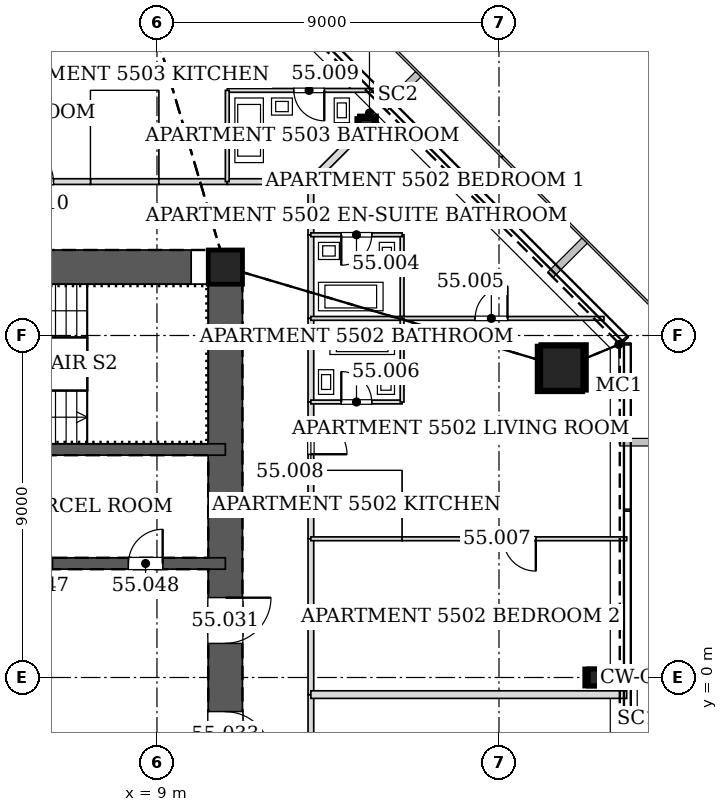
"""IFC4 building model, lengths in metres.
Left out: names, types, materials, properties, quantities, classifications, styles, units other than length and angle.
Written with IfcOpenShell. Run it as: python <this file> out.ifc"""

import sys

from ifc_helpers import new_model, si_unit, direction, frame, frame_2d, origin, origin_2d, place, context, subcontext, project, spatial, rectangle, hollow_rectangle, extrude, element, fill, save


model = new_model("IFC4")
c1 = context("Model", 3, precision=1e-05, world=origin(), true_north=direction((0.0, 1.0)))
c2 = subcontext(c1, "Body", "Model", "MODEL_VIEW")
j1 = project(units=[si_unit("LENGTHUNIT", "METRE"), si_unit("PLANEANGLEUNIT", "RADIAN")], contexts=[c1])
p1 = place(None, origin())
s1 = spatial("IfcSite", under=j1, at=p1, CompositionType="ELEMENT")
p2 = place(p1, origin())
s2 = spatial("IfcBuilding", under=s1, at=p2, CompositionType="ELEMENT")
p3 = place(p2, frame((0.0, 0.0, 234.6)))
s3 = spatial("IfcBuildingStorey", under=s2, at=p3, CompositionType="ELEMENT", Elevation=234.6)
p4 = place(p3, frame((19.7, 8.16, 0.0), z_axis=(-0.02827915051, -0.01169924247, 0.999531598986), x_axis=(0.382282742426, -0.924045401938, 0.0)))
e1 = element("IfcColumn", 1, at=p4, inside=s3, PredefinedType="COLUMN", context=c2, shape_type="SweptSolid", body=[
    extrude(hollow_rectangle(XDim=1.2, YDim=1.2, WallThickness=0.055, at=origin_2d()), origin(), (0.0, 0.0, 1.0), 3.402),
])
for number, where, z_axis, x_axis in (
    (2, (20.578, 0.0, 0.0), (-0.028, 0.0, 1.0), (0.0, -1.0, 0.0)),
    (3, (14.551, 14.551, 0.0), (-0.02, -0.02, 1.0), (0.707, -0.707, 0.0)),
):
    element("IfcColumn", number, at=place(p3, frame(where, z_axis=z_axis, x_axis=x_axis)), inside=s3, PredefinedType="COLUMN", context=c2, shape_type="SweptSolid", body=[
        extrude(hollow_rectangle(XDim=0.45, YDim=0.45, WallThickness=0.02, at=origin_2d()), origin(), (0.0, 0.0, 1.0), 3.401),
    ])
p5 = place(p3, frame((10.8, 10.8, 0.0), z_axis=(0.0, 0.0, 1.0), x_axis=(1.0, 0.0, 0.0)))
e4 = element("IfcColumn", 4, at=p5, inside=s3, PredefinedType="COLUMN", context=c2, shape_type="SweptSolid", body=[
    extrude(hollow_rectangle(XDim=0.9, YDim=0.9, WallThickness=0.04, at=origin_2d()), origin(), (0.0, 0.0, 1.0), 3.4),
])
p6 = place(p3, frame((10.8, -10.8, 0.0), z_axis=(0.0, 0.0, 1.0), x_axis=(0.0, 1.0, 0.0)))
e5 = element("IfcWall", 5, at=p6, inside=s3, PredefinedType="SOLIDWALL", context=c2, shape_type="SweptSolid", body=[
    extrude(rectangle(XDim=21.6, YDim=0.9, at=frame_2d((10.8, 0.0))), origin(), (0.0, 0.0, 1.0), 3.4),
])
p7 = place(p6, frame((11.7, 0.0, 0.0)))
e6 = element("IfcOpeningElement", 6, at=p7, cuts=e5, PredefinedType="OPENING", context=c2, shape_type="SweptSolid", body=[
    extrude(rectangle(XDim=1.2, YDim=2.1, at=frame_2d((0.6, 1.05))), frame((0.0, 0.46, 0.0), z_axis=(0.0, -1.0, 0.0), x_axis=(1.0, 0.0, 0.0)), (0.0, 0.0, 1.0), 0.92),
])
p8 = place(p6, frame((8.7, 0.0, 0.0)))
e7 = element("IfcOpeningElement", 7, at=p8, cuts=e5, PredefinedType="OPENING", context=c2, shape_type="SweptSolid", body=[
    extrude(rectangle(XDim=1.2, YDim=2.1, at=frame_2d((0.6, 1.05))), frame((0.0, 0.46, 0.0), z_axis=(0.0, -1.0, 0.0), x_axis=(1.0, 0.0, 0.0)), (0.0, 0.0, 1.0), 0.92),
])
p9 = place(p3, frame((10.8, 10.8, 0.0), z_axis=(0.0, 0.0, 1.0), x_axis=(-1.0, 0.0, 0.0)))
e8 = element("IfcWall", 8, at=p9, inside=s3, PredefinedType="SOLIDWALL", context=c2, shape_type="SweptSolid", body=[
    extrude(rectangle(XDim=21.6, YDim=0.9, at=frame_2d((10.8, 0.0))), origin(), (0.0, 0.0, 1.0), 3.4),
])
p10 = place(p9, frame((10.05, 0.0, 0.0)))
e9 = element("IfcOpeningElement", 9, at=p10, cuts=e8, PredefinedType="OPENING", context=c2, shape_type="SweptSolid", body=[
    extrude(rectangle(XDim=1.5, YDim=2.1, at=frame_2d((0.75, 1.05))), frame((0.0, 0.46, 0.0), z_axis=(0.0, -1.0, 0.0), x_axis=(1.0, 0.0, 0.0)), (0.0, 0.0, 1.0), 0.92),
])
p11 = place(p3, frame((-10.8, 3.0, 0.0), z_axis=(0.0, 0.0, 1.0), x_axis=(1.0, 0.0, 0.0)))
e10 = element("IfcWall", 10, at=p11, inside=s3, PredefinedType="SOLIDWALL", context=c2, shape_type="SweptSolid", body=[
    extrude(rectangle(XDim=21.6, YDim=0.3, at=frame_2d((10.8, 0.0))), origin(), (0.0, 0.0, 1.0), 3.4),
])
p12 = place(p11, frame((1.65, 0.0, 0.0)))
e11 = element("IfcOpeningElement", 11, at=p12, cuts=e10, PredefinedType="OPENING", context=c2, shape_type="SweptSolid", body=[
    extrude(rectangle(XDim=0.9, YDim=2.1, at=frame_2d((0.45, 1.05))), frame((0.0, 0.16, 0.0), z_axis=(0.0, -1.0, 0.0), x_axis=(1.0, 0.0, 0.0)), (0.0, 0.0, 1.0), 0.32),
])
p13 = place(p11, frame((7.45, 0.0, 0.0)))
e12 = element("IfcOpeningElement", 12, at=p13, cuts=e10, PredefinedType="OPENING", context=c2, shape_type="SweptSolid", body=[
    extrude(rectangle(XDim=0.9, YDim=2.1, at=frame_2d((0.45, 1.05))), frame((0.0, 0.16, 0.0), z_axis=(0.0, -1.0, 0.0), x_axis=(1.0, 0.0, 0.0)), (0.0, 0.0, 1.0), 0.32),
])
p14 = place(p11, frame((13.25, 0.0, 0.0)))
e13 = element("IfcOpeningElement", 13, at=p14, cuts=e10, PredefinedType="OPENING", context=c2, shape_type="SweptSolid", body=[
    extrude(rectangle(XDim=0.9, YDim=2.1, at=frame_2d((0.45, 1.05))), frame((0.0, 0.16, 0.0), z_axis=(0.0, -1.0, 0.0), x_axis=(1.0, 0.0, 0.0)), (0.0, 0.0, 1.0), 0.32),
])
p15 = place(p11, frame((16.15, 0.0, 0.0)))
e14 = element("IfcOpeningElement", 14, at=p15, cuts=e10, PredefinedType="OPENING", context=c2, shape_type="SweptSolid", body=[
    extrude(rectangle(XDim=0.9, YDim=2.1, at=frame_2d((0.45, 1.05))), frame((0.0, 0.16, 0.0), z_axis=(0.0, -1.0, 0.0), x_axis=(1.0, 0.0, 0.0)), (0.0, 0.0, 1.0), 0.32),
])
p16 = place(p11, frame((19.05, 0.0, 0.0)))
e15 = element("IfcOpeningElement", 15, at=p16, cuts=e10, PredefinedType="OPENING", context=c2, shape_type="SweptSolid", body=[
    extrude(rectangle(XDim=0.9, YDim=2.1, at=frame_2d((0.45, 1.05))), frame((0.0, 0.16, 0.0), z_axis=(0.0, -1.0, 0.0), x_axis=(1.0, 0.0, 0.0)), (0.0, 0.0, 1.0), 0.32),
])
p17 = place(p11, frame((4.55, 0.0, 0.0)))
e16 = element("IfcOpeningElement", 16, at=p17, cuts=e10, PredefinedType="OPENING", context=c2, shape_type="SweptSolid", body=[
    extrude(rectangle(XDim=0.9, YDim=2.1, at=frame_2d((0.45, 1.05))), frame((0.0, 0.16, 0.0), z_axis=(0.0, -1.0, 0.0), x_axis=(1.0, 0.0, 0.0)), (0.0, 0.0, 1.0), 0.32),
])
p18 = place(p3, frame((-10.8, 6.0, 0.0), z_axis=(0.0, 0.0, 1.0), x_axis=(1.0, 0.0, 0.0)))
e17 = element("IfcWall", 17, at=p18, inside=s3, PredefinedType="SOLIDWALL", context=c2, shape_type="SweptSolid", body=[
    extrude(rectangle(XDim=21.6, YDim=0.3, at=frame_2d((10.8, 0.0))), origin(), (0.0, 0.0, 1.0), 3.4),
])
p19 = place(p18, frame((10.25, 0.0, 0.0)))
e18 = element("IfcOpeningElement", 18, at=p19, cuts=e17, PredefinedType="OPENING", context=c2, shape_type="SweptSolid", body=[
    extrude(rectangle(XDim=1.1, YDim=2.1, at=frame_2d((0.55, 1.05))), frame((0.0, 0.16, 0.0), z_axis=(0.0, -1.0, 0.0), x_axis=(1.0, 0.0, 0.0)), (0.0, 0.0, 1.0), 0.32),
])
p20 = place(p3, frame((13.05, -3.651, 0.0), z_axis=(0.0, 0.0, 1.0), x_axis=(0.0, 1.0, 0.0)))
e19 = element("IfcWall", 19, at=p20, inside=s3, PredefinedType="PARTITIONING", context=c2, shape_type="SweptSolid", body=[
    extrude(rectangle(XDim=3.202, YDim=0.15, at=frame_2d((1.601, 0.0))), origin(), (0.0, 0.0, 1.0), 2.73),
])
p21 = place(p20, frame((1.126, 0.0, 0.0)))
e20 = element("IfcOpeningElement", 20, at=p21, cuts=e19, PredefinedType="OPENING", context=c2, shape_type="SweptSolid", body=[
    extrude(rectangle(XDim=0.95, YDim=2.1, at=frame_2d((0.475, 1.05))), frame((0.0, 0.085, 0.0), z_axis=(0.0, -1.0, 0.0), x_axis=(1.0, 0.0, 0.0)), (0.0, 0.0, 1.0), 0.17),
])
p22 = place(p3, frame((13.05, 9.449, 0.0), z_axis=(0.0, 0.0, 1.0), x_axis=(0.0, 1.0, 0.0)))
e21 = element("IfcWall", 21, at=p22, inside=s3, PredefinedType="PARTITIONING", context=c2, shape_type="SweptSolid", body=[
    extrude(rectangle(XDim=2.202, YDim=0.15, at=frame_2d((1.101, 0.0))), origin(), (0.0, 0.0, 1.0), 2.344),
])
p23 = place(p3, frame((13.05, 11.649, 0.0), z_axis=(0.0, 0.0, 1.0), x_axis=(0.0, 1.0, 0.0)))
e22 = element("IfcWall", 22, at=p23, inside=s3, PredefinedType="PARTITIONING", context=c2, shape_type="SweptSolid", body=[
    extrude(rectangle(XDim=1.401, YDim=0.15, at=frame_2d((0.701, 0.0))), origin(), (0.0, 0.0, 1.0), 2.583),
])
p24 = place(p3, frame((13.05, 7.249, 0.0), z_axis=(0.0, 0.0, 1.0), x_axis=(0.0, 1.0, 0.0)))
e23 = element("IfcWall", 23, at=p24, inside=s3, PredefinedType="PARTITIONING", context=c2, shape_type="SweptSolid", body=[
    extrude(rectangle(XDim=2.202, YDim=0.15, at=frame_2d((1.101, 0.0))), origin(), (0.0, 0.0, 1.0), 2.73),
])
p25 = place(p3, frame((13.05, 3.649, 0.0), z_axis=(0.0, 0.0, 1.0), x_axis=(0.0, 1.0, 0.0)))
e24 = element("IfcWall", 24, at=p25, inside=s3, PredefinedType="PARTITIONING", context=c2, shape_type="SweptSolid", body=[
    extrude(rectangle(XDim=1.802, YDim=0.15, at=frame_2d((0.901, 0.0))), origin(), (0.0, 0.0, 1.0), 2.73),
])
p26 = place(p3, frame((13.05, -0.451, 0.0), z_axis=(0.0, 0.0, 1.0), x_axis=(0.0, 1.0, 0.0)))
e25 = element("IfcWall", 25, at=p26, inside=s3, PredefinedType="PARTITIONING", context=c2, shape_type="SweptSolid", body=[
    extrude(rectangle(XDim=4.102, YDim=0.15, at=frame_2d((2.051, 0.0))), origin(), (0.0, 0.0, 1.0), 2.331),
])
p27 = place(p3, frame((13.05, 5.449, 0.0), z_axis=(0.0, 0.0, 1.0), x_axis=(0.0, 1.0, 0.0)))
e26 = element("IfcWall", 26, at=p27, inside=s3, PredefinedType="PARTITIONING", context=c2, shape_type="SweptSolid", body=[
    extrude(rectangle(XDim=1.802, YDim=0.15, at=frame_2d((0.901, 0.0))), origin(), (0.0, 0.0, 1.0), 2.73),
])
p28 = place(p27, frame((0.426, 0.0, 0.0)))
e27 = element("IfcOpeningElement", 27, at=p28, cuts=e26, PredefinedType="OPENING", context=c2, shape_type="SweptSolid", body=[
    extrude(rectangle(XDim=0.95, YDim=2.1, at=frame_2d((0.475, 1.05))), frame((0.0, 0.085, 0.0), z_axis=(0.0, -1.0, 0.0), x_axis=(1.0, 0.0, 0.0)), (0.0, 0.0, 1.0), 0.17),
])
p29 = place(p3, frame((13.05, 13.05, 0.0), z_axis=(0.0, 0.0, 1.0), x_axis=(-1.0, 0.0, 0.0)))
e28 = element("IfcWall", 28, at=p29, inside=s3, PredefinedType="PARTITIONING", context=c2, shape_type="SweptSolid", body=[
    extrude(rectangle(XDim=2.201, YDim=0.15, at=frame_2d((1.101, 0.0))), origin(), (0.0, 0.0, 1.0), 2.583),
])
p30 = place(p3, frame((9.051, 13.05, 0.0), z_axis=(0.0, 0.0, 1.0), x_axis=(-1.0, 0.0, 0.0)))
e29 = element("IfcWall", 29, at=p30, inside=s3, PredefinedType="PARTITIONING", context=c2, shape_type="SweptSolid", body=[
    extrude(rectangle(XDim=1.802, YDim=0.15, at=frame_2d((0.901, 0.0))), origin(), (0.0, 0.0, 1.0), 2.73),
])
p31 = place(p3, frame((7.251, 13.05, 0.0), z_axis=(0.0, 0.0, 1.0), x_axis=(-1.0, 0.0, 0.0)))
e30 = element("IfcWall", 30, at=p31, inside=s3, PredefinedType="PARTITIONING", context=c2, shape_type="SweptSolid", body=[
    extrude(rectangle(XDim=2.902, YDim=0.15, at=frame_2d((1.451, 0.0))), origin(), (0.0, 0.0, 1.0), 2.73),
])
p32 = place(p31, frame((0.976, 0.0, 0.0)))
e31 = element("IfcOpeningElement", 31, at=p32, cuts=e30, PredefinedType="OPENING", context=c2, shape_type="SweptSolid", body=[
    extrude(rectangle(XDim=0.95, YDim=2.1, at=frame_2d((0.475, 1.05))), frame((0.0, 0.085, 0.0), z_axis=(0.0, -1.0, 0.0), x_axis=(1.0, 0.0, 0.0)), (0.0, 0.0, 1.0), 0.17),
])
p33 = place(p3, frame((10.851, 13.05, 0.0), z_axis=(0.0, 0.0, 1.0), x_axis=(-1.0, 0.0, 0.0)))
e32 = element("IfcWall", 32, at=p33, inside=s3, PredefinedType="PARTITIONING", context=c2, shape_type="SweptSolid", body=[
    extrude(rectangle(XDim=1.802, YDim=0.15, at=frame_2d((0.901, 0.0))), origin(), (0.0, 0.0, 1.0), 2.344),
])
p34 = place(p3, frame((21.36, -0.45, 0.0), z_axis=(0.0, 0.0, 1.0), x_axis=(-1.0, 0.0, 0.0)))
e33 = element("IfcWall", 33, at=p34, inside=s3, PredefinedType="PARTITIONING", context=c2, shape_type="SweptSolid", body=[
    extrude(rectangle(XDim=8.31, YDim=0.2, at=frame_2d((4.155, 0.0))), origin(), (0.0, 0.0, 1.0), 2.662),
])
p35 = place(p3, frame((15.45, 9.45, 0.0), z_axis=(0.0, 0.0, 1.0), x_axis=(0.0, 1.0, 0.0)))
e34 = element("IfcWall", 34, at=p35, inside=s3, PredefinedType="PARTITIONING", context=c2, shape_type="SweptSolid", body=[
    extrude(rectangle(XDim=2.2, YDim=0.1, at=frame_2d((1.1, 0.0))), origin(), (0.0, 0.0, 1.0), 2.344),
])
p36 = place(p3, frame((15.45, 11.65, 0.0), z_axis=(0.0, 0.0, 1.0), x_axis=(-1.0, 0.0, 0.0)))
e35 = element("IfcWall", 35, at=p36, inside=s3, PredefinedType="PARTITIONING", context=c2, shape_type="SweptSolid", body=[
    extrude(rectangle(XDim=2.4, YDim=0.1, at=frame_2d((1.2, 0.0))), origin(), (0.0, 0.0, 1.0), 2.786),
])
p37 = place(p36, frame((0.8, 0.0, 0.0)))
e36 = element("IfcOpeningElement", 36, at=p37, cuts=e35, PredefinedType="OPENING", context=c2, shape_type="SweptSolid", body=[
    extrude(rectangle(XDim=0.8, YDim=2.1, at=frame_2d((0.4, 1.05))), frame((0.0, 0.06, 0.0), z_axis=(0.0, -1.0, 0.0), x_axis=(1.0, 0.0, 0.0)), (0.0, 0.0, 1.0), 0.12),
])
p38 = place(p3, frame((13.05, 9.45, 0.0), z_axis=(0.0, 0.0, 1.0), x_axis=(1.0, 0.0, 0.0)))
e37 = element("IfcWall", 37, at=p38, inside=s3, PredefinedType="PARTITIONING", context=c2, shape_type="SweptSolid", body=[
    extrude(rectangle(XDim=2.4, YDim=0.1, at=frame_2d((1.2, 0.0))), origin(), (0.0, 0.0, 1.0), 2.344),
])
p39 = place(p3, frame((15.45, 9.45, 0.0), z_axis=(0.0, 0.0, 1.0), x_axis=(1.0, 0.0, 0.0)))
e38 = element("IfcWall", 38, at=p39, inside=s3, PredefinedType="PARTITIONING", context=c2, shape_type="SweptSolid", body=[
    extrude(rectangle(XDim=5.312, YDim=0.1, at=frame_2d((2.656, 0.0))), origin(), (0.0, 0.0, 1.0), 2.344),
])
p40 = place(p39, frame((1.924, 0.0, 0.0)))
e39 = element("IfcOpeningElement", 39, at=p40, cuts=e38, PredefinedType="OPENING", context=c2, shape_type="SweptSolid", body=[
    extrude(rectangle(XDim=0.85, YDim=2.1, at=frame_2d((0.425, 1.05))), frame((0.0, 0.06, 0.0), z_axis=(0.0, -1.0, 0.0), x_axis=(1.0, 0.0, 0.0)), (0.0, 0.0, 1.0), 0.12),
])
p41 = place(p3, frame((14.31, 14.31, 0.0), z_axis=(0.0, 0.0, 1.0), x_axis=(-0.707106781187, -0.707106781187, 0.0)))
e40 = element("IfcWall", 40, at=p41, inside=s3, PredefinedType="PARTITIONING", context=c2, shape_type="SweptSolid", body=[
    extrude(rectangle(XDim=1.782, YDim=0.2, at=frame_2d((0.891, 0.0))), origin(), (0.0, 0.0, 1.0), 2.583),
])
p42 = place(p3, frame((13.05, 7.25, 0.0), z_axis=(0.0, 0.0, 1.0), x_axis=(1.0, 0.0, 0.0)))
e41 = element("IfcWall", 41, at=p42, inside=s3, PredefinedType="PARTITIONING", context=c2, shape_type="SweptSolid", body=[
    extrude(rectangle(XDim=2.4, YDim=0.1, at=frame_2d((1.2, 0.0))), origin(), (0.0, 0.0, 1.0), 2.73),
])
p43 = place(p42, frame((0.8, 0.0, 0.0)))
e42 = element("IfcOpeningElement", 42, at=p43, cuts=e41, PredefinedType="OPENING", context=c2, shape_type="SweptSolid", body=[
    extrude(rectangle(XDim=0.8, YDim=2.1, at=frame_2d((0.4, 1.05))), frame((0.0, 0.06, 0.0), z_axis=(0.0, -1.0, 0.0), x_axis=(1.0, 0.0, 0.0)), (0.0, 0.0, 1.0), 0.12),
])
p44 = place(p3, frame((15.45, 7.25, 0.0), z_axis=(0.0, 0.0, 1.0), x_axis=(0.0, 1.0, 0.0)))
e43 = element("IfcWall", 43, at=p44, inside=s3, PredefinedType="PARTITIONING", context=c2, shape_type="SweptSolid", body=[
    extrude(rectangle(XDim=2.2, YDim=0.1, at=frame_2d((1.1, 0.0))), origin(), (0.0, 0.0, 1.0), 2.344),
])
p45 = place(p3, frame((13.05, 3.65, 0.0), z_axis=(0.0, 0.0, 1.0), x_axis=(1.0, 0.0, 0.0)))
e44 = element("IfcWall", 44, at=p45, inside=s3, PredefinedType="PARTITIONING", context=c2, shape_type="SweptSolid", body=[
    extrude(rectangle(XDim=2.4, YDim=0.1, at=frame_2d((1.2, 0.0))), origin(), (0.0, 0.0, 1.0), 2.73),
])
p46 = place(p3, frame((21.362, 3.65, 0.0), z_axis=(0.0, 0.0, 1.0), x_axis=(-1.0, 0.0, 0.0)))
e45 = element("IfcWall", 45, at=p46, inside=s3, PredefinedType="PARTITIONING", context=c2, shape_type="SweptSolid", body=[
    extrude(rectangle(XDim=5.913, YDim=0.1, at=frame_2d((2.957, 0.0))), origin(), (0.0, 0.0, 1.0), 2.662),
])
p47 = place(p46, frame((2.394, 0.0, 0.0)))
e46 = element("IfcOpeningElement", 46, at=p47, cuts=e45, PredefinedType="OPENING", context=c2, shape_type="SweptSolid", body=[
    extrude(rectangle(XDim=0.85, YDim=2.1, at=frame_2d((0.425, 1.05))), frame((0.0, 0.06, 0.0), z_axis=(0.0, -1.0, 0.0), x_axis=(1.0, 0.0, 0.0)), (0.0, 0.0, 1.0), 0.12),
])
p48 = place(p3, frame((14.762, 15.45, 0.0), z_axis=(0.0, 0.0, 1.0), x_axis=(-1.0, 0.0, 0.0)))
e47 = element("IfcWall", 47, at=p48, inside=s3, PredefinedType="PARTITIONING", context=c2, shape_type="SweptSolid", body=[
    extrude(rectangle(XDim=3.912, YDim=0.1, at=frame_2d((1.956, 0.0))), origin(), (0.0, 0.0, 1.0), 2.783),
])
p49 = place(p48, frame((1.359, 0.0, 0.0)))
e48 = element("IfcOpeningElement", 48, at=p49, cuts=e47, PredefinedType="OPENING", context=c2, shape_type="SweptSolid", body=[
    extrude(rectangle(XDim=0.8, YDim=2.1, at=frame_2d((0.4, 1.05))), frame((0.0, 0.06, 0.0), z_axis=(0.0, -1.0, 0.0), x_axis=(1.0, 0.0, 0.0)), (0.0, 0.0, 1.0), 0.12),
])
p50 = place(p3, frame((10.85, 15.45, 0.0), z_axis=(0.0, 0.0, 1.0), x_axis=(0.0, -1.0, 0.0)))
e49 = element("IfcWall", 49, at=p50, inside=s3, PredefinedType="PARTITIONING", context=c2, shape_type="SweptSolid", body=[
    extrude(rectangle(XDim=2.4, YDim=0.1, at=frame_2d((1.2, 0.0))), origin(), (0.0, 0.0, 1.0), 2.786),
])
p51 = place(p37, origin())
e50 = element("IfcDoor", 50, at=p51, inside=s3, OperationType="SINGLE_SWING_RIGHT", PredefinedType="DOOR", context=c2, shape_type="SweptSolid", body=[
    extrude(rectangle(XDim=0.8, YDim=2.1, at=frame_2d((0.4, 1.05))), frame((0.0, 0.025, 0.0), z_axis=(0.0, -1.0, 0.0), x_axis=(1.0, 0.0, 0.0)), (0.0, 0.0, 1.0), 0.05),
])
fill(e36, e50)
p52 = place(p40, origin())
e51 = element("IfcDoor", 51, at=p52, inside=s3, OperationType="SINGLE_SWING_RIGHT", PredefinedType="DOOR", context=c2, shape_type="SweptSolid", body=[
    extrude(rectangle(XDim=0.85, YDim=2.1, at=frame_2d((0.425, 1.05))), frame((0.0, 0.025, 0.0), z_axis=(0.0, -1.0, 0.0), x_axis=(1.0, 0.0, 0.0)), (0.0, 0.0, 1.0), 0.05),
])
fill(e39, e51)
p53 = place(p43, origin())
e52 = element("IfcDoor", 52, at=p53, inside=s3, OperationType="SINGLE_SWING_LEFT", PredefinedType="DOOR", context=c2, shape_type="SweptSolid", body=[
    extrude(rectangle(XDim=0.8, YDim=2.1, at=frame_2d((0.4, 1.05))), frame((0.0, 0.025, 0.0), z_axis=(0.0, -1.0, 0.0), x_axis=(1.0, 0.0, 0.0)), (0.0, 0.0, 1.0), 0.05),
])
fill(e42, e52)
p54 = place(p47, origin())
e53 = element("IfcDoor", 53, at=p54, inside=s3, OperationType="SINGLE_SWING_LEFT", PredefinedType="DOOR", context=c2, shape_type="SweptSolid", body=[
    extrude(rectangle(XDim=0.85, YDim=2.1, at=frame_2d((0.425, 1.05))), frame((0.0, 0.025, 0.0), z_axis=(0.0, -1.0, 0.0), x_axis=(1.0, 0.0, 0.0)), (0.0, 0.0, 1.0), 0.05),
])
fill(e46, e53)
p55 = place(p28, frame((0.95, 0.0, 0.0), z_axis=(0.0, 0.0, 1.0), x_axis=(-1.0, 0.0, 0.0)))
e54 = element("IfcDoor", 54, at=p55, inside=s3, OperationType="SINGLE_SWING_RIGHT", PredefinedType="DOOR", context=c2, shape_type="SweptSolid", body=[
    extrude(rectangle(XDim=0.95, YDim=2.1, at=frame_2d((0.475, 1.05))), frame((0.0, 0.025, 0.0), z_axis=(0.0, -1.0, 0.0), x_axis=(1.0, 0.0, 0.0)), (0.0, 0.0, 1.0), 0.05),
])
fill(e27, e54)
p56 = place(p49, origin())
e55 = element("IfcDoor", 55, at=p56, inside=s3, OperationType="SINGLE_SWING_LEFT", PredefinedType="DOOR", context=c2, shape_type="SweptSolid", body=[
    extrude(rectangle(XDim=0.8, YDim=2.1, at=frame_2d((0.4, 1.05))), frame((0.0, 0.025, 0.0), z_axis=(0.0, -1.0, 0.0), x_axis=(1.0, 0.0, 0.0)), (0.0, 0.0, 1.0), 0.05),
])
fill(e48, e55)
p57 = place(p32, frame((0.95, 0.0, 0.0), z_axis=(0.0, 0.0, 1.0), x_axis=(-1.0, 0.0, 0.0)))
e56 = element("IfcDoor", 56, at=p57, inside=s3, OperationType="SINGLE_SWING_LEFT", PredefinedType="DOOR", context=c2, shape_type="SweptSolid", body=[
    extrude(rectangle(XDim=0.95, YDim=2.1, at=frame_2d((0.475, 1.05))), frame((0.0, 0.025, 0.0), z_axis=(0.0, -1.0, 0.0), x_axis=(1.0, 0.0, 0.0)), (0.0, 0.0, 1.0), 0.05),
])
fill(e31, e56)
p58 = place(p7, frame((1.2, 0.0, 0.0), z_axis=(0.0, 0.0, 1.0), x_axis=(-1.0, 0.0, 0.0)))
e57 = element("IfcDoor", 57, at=p58, inside=s3, OperationType="SINGLE_SWING_LEFT", PredefinedType="DOOR", context=c2, shape_type="SweptSolid", body=[
    extrude(rectangle(XDim=1.2, YDim=2.1, at=frame_2d((0.6, 1.05))), frame((0.0, 0.025, 0.0), z_axis=(0.0, -1.0, 0.0), x_axis=(1.0, 0.0, 0.0)), (0.0, 0.0, 1.0), 0.05),
])
fill(e6, e57)
p59 = place(p8, frame((1.2, 0.0, 0.0), z_axis=(0.0, 0.0, 1.0), x_axis=(-1.0, 0.0, 0.0)))
e58 = element("IfcDoor", 58, at=p59, inside=s3, OperationType="SINGLE_SWING_RIGHT", PredefinedType="DOOR", context=c2, shape_type="SweptSolid", body=[
    extrude(rectangle(XDim=1.2, YDim=2.1, at=frame_2d((0.6, 1.05))), frame((0.0, 0.025, 0.0), z_axis=(0.0, -1.0, 0.0), x_axis=(1.0, 0.0, 0.0)), (0.0, 0.0, 1.0), 0.05),
])
fill(e7, e58)
p60 = place(p16, origin())
e59 = element("IfcDoor", 59, at=p60, inside=s3, OperationType="SINGLE_SWING_RIGHT", PredefinedType="DOOR", context=c2, shape_type="SweptSolid", body=[
    extrude(rectangle(XDim=0.9, YDim=2.1, at=frame_2d((0.45, 1.05))), frame((0.0, 0.025, 0.0), z_axis=(0.0, -1.0, 0.0), x_axis=(1.0, 0.0, 0.0)), (0.0, 0.0, 1.0), 0.05),
])
fill(e15, e59)
save(model, sys.argv[1])
